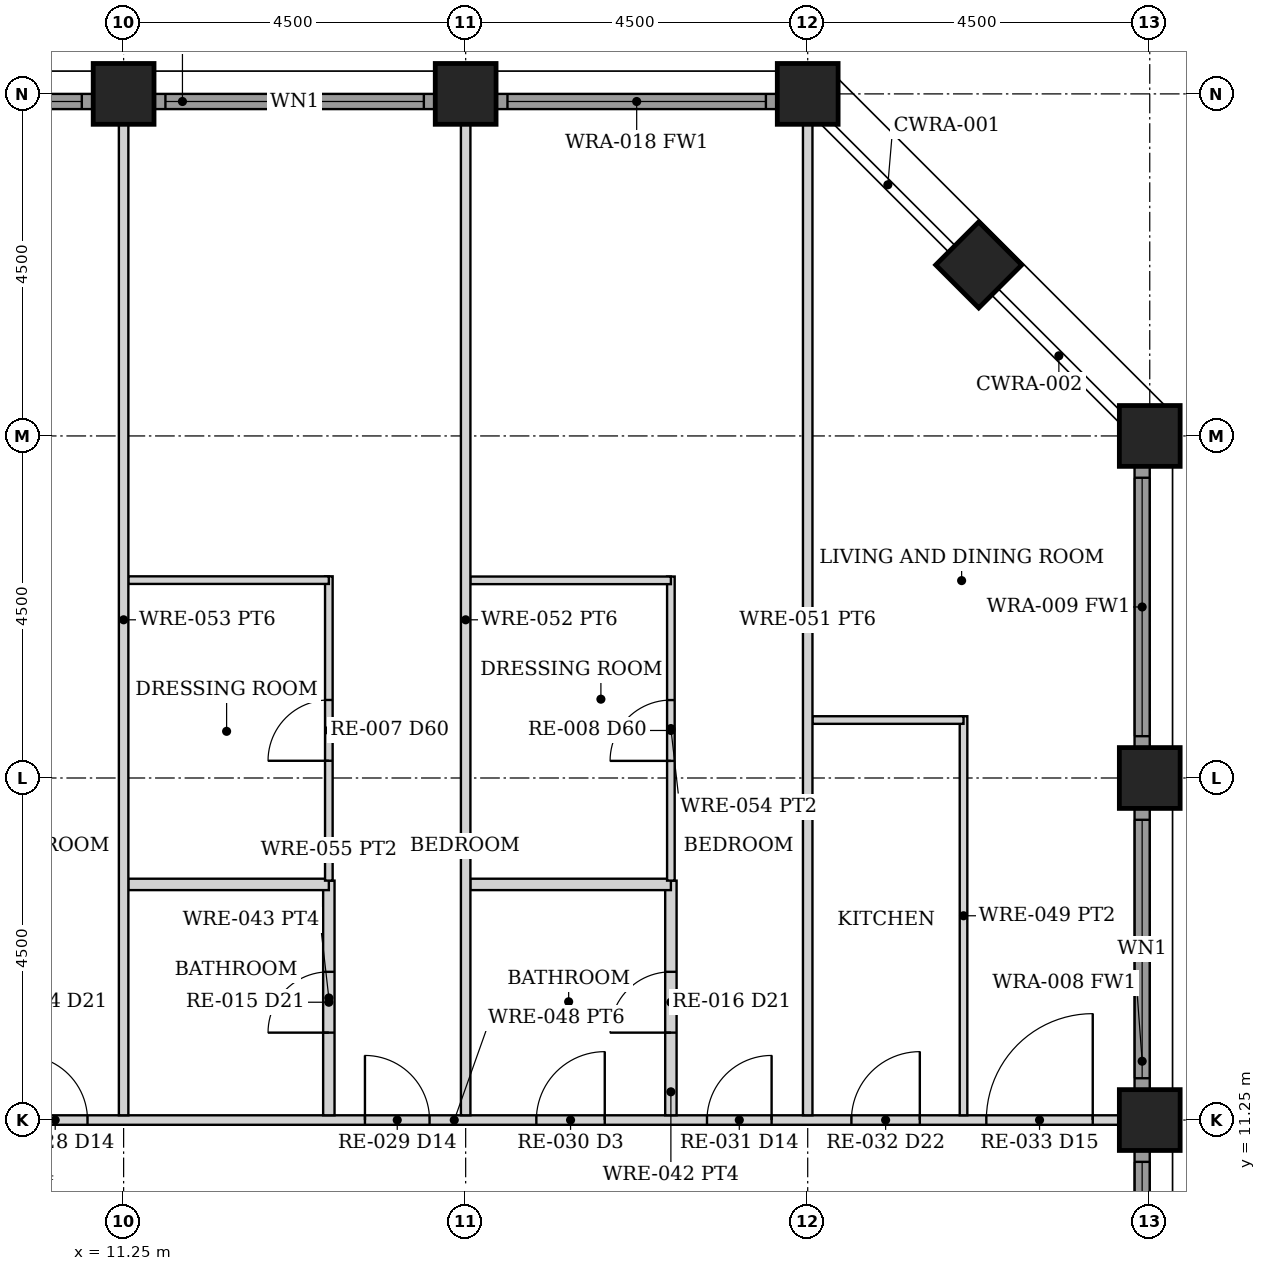
"""IFC4 building model, lengths in metres.
Left out: names, types, materials, properties, quantities, classifications, styles, units other than length and angle.
Written with IfcOpenShell. Run it as: python <this file> out.ifc"""

import sys

from ifc_helpers import new_model, si_unit, direction, frame, frame_2d, origin, origin_2d, place, context, subcontext, project, spatial, rectangle, hollow_rectangle, extrude, element, fill, save


model = new_model("IFC4")
c1 = context("Model", 3, precision=1e-05, world=origin(), true_north=direction((0.0, 1.0)))
c2 = subcontext(c1, "Body", "Model", "MODEL_VIEW")
j1 = project(units=[si_unit("LENGTHUNIT", "METRE"), si_unit("PLANEANGLEUNIT", "RADIAN")], contexts=[c1])
p1 = place(None, origin())
s1 = spatial("IfcSite", under=j1, at=p1, CompositionType="ELEMENT")
p2 = place(p1, origin())
s2 = spatial("IfcBuilding", under=s1, at=p2, CompositionType="ELEMENT")
p3 = place(p2, frame((0.0, 0.0, 68.5)))
s3 = spatial("IfcBuildingStorey", under=s2, at=p3, CompositionType="ELEMENT", Elevation=68.5)
for number, where, z_axis, x_axis in (
    (1, (11.25, 24.75, 0.0), (0.0, 0.0, 1.0), (0.0, 1.0, 0.0)),
    (2, (24.75, 11.25, 0.0), (0.0, 0.0, 1.0), (1.0, 0.0, 0.0)),
    (3, (15.75, 24.75, 0.0), (0.0, 0.0, 1.0), (0.0, 1.0, 0.0)),
    (4, (24.75, 15.75, 0.0), (0.0, 0.0, 1.0), (1.0, 0.0, 0.0)),
    (5, (20.25, 24.75, 0.0), (0.0, 0.0, 1.0), (0.0, 1.0, 0.0)),
    (6, (24.75, 20.25, 0.0), (0.0, 0.0, 1.0), (1.0, 0.0, 0.0)),
    (7, (22.5, 22.5, 0.0), (0.0, 0.0, 1.0), (0.707, 0.707, 0.0)),
):
    element("IfcColumn", number, at=place(p3, frame(where, z_axis=z_axis, x_axis=x_axis)), inside=s3, PredefinedType="COLUMN", context=c2, shape_type="SweptSolid", body=[
        extrude(hollow_rectangle(XDim=0.8, YDim=0.8, WallThickness=0.06, at=origin_2d()), origin(), (0.0, 0.0, 1.0), 3.5),
    ])
p4 = place(p3, frame((24.65, 7.155, 0.0), z_axis=(0.0, 0.0, 1.0), x_axis=(0.0, 1.0, 0.0)))
e8 = element("IfcWall", 8, at=p4, inside=s3, PredefinedType="SOLIDWALL", context=c2, shape_type="SweptSolid", body=[
    extrude(rectangle(XDim=3.69, YDim=0.2, at=frame_2d((1.845, 0.0))), origin(), (0.0, 0.0, 1.0), 2.379),
])
p5 = place(p4, frame((0.145, 0.0, 0.3)))
e9 = element("IfcOpeningElement", 9, at=p5, cuts=e8, PredefinedType="OPENING", context=c2, shape_type="SweptSolid", body=[
    extrude(rectangle(XDim=3.4, YDim=1.929, at=frame_2d((1.7, 0.964))), frame((0.0, 0.11, 0.0), z_axis=(0.0, -1.0, 0.0), x_axis=(1.0, 0.0, 0.0)), (0.0, 0.0, 1.0), 0.22),
])
p6 = place(p3, frame((24.65, 11.655, 0.0), z_axis=(0.0, 0.0, 1.0), x_axis=(0.0, 1.0, 0.0)))
e10 = element("IfcWall", 10, at=p6, inside=s3, PredefinedType="SOLIDWALL", context=c2, shape_type="SweptSolid", body=[
    extrude(rectangle(XDim=3.69, YDim=0.2, at=frame_2d((1.845, 0.0))), origin(), (0.0, 0.0, 1.0), 2.379),
])
p7 = place(p6, frame((0.145, 0.0, 0.3)))
e11 = element("IfcOpeningElement", 11, at=p7, cuts=e10, PredefinedType="OPENING", context=c2, shape_type="SweptSolid", body=[
    extrude(rectangle(XDim=3.4, YDim=1.929, at=frame_2d((1.7, 0.964))), frame((0.0, 0.11, 0.0), z_axis=(0.0, -1.0, 0.0), x_axis=(1.0, 0.0, 0.0)), (0.0, 0.0, 1.0), 0.22),
])
p8 = place(p3, frame((24.65, 16.155, 0.0), z_axis=(0.0, 0.0, 1.0), x_axis=(0.0, 1.0, 0.0)))
e12 = element("IfcWall", 12, at=p8, inside=s3, PredefinedType="SOLIDWALL", context=c2, shape_type="SweptSolid", body=[
    extrude(rectangle(XDim=3.69, YDim=0.2, at=frame_2d((1.845, 0.0))), origin(), (0.0, 0.0, 1.0), 2.379),
])
p9 = place(p8, frame((0.145, 0.0, 0.3)))
e13 = element("IfcOpeningElement", 13, at=p9, cuts=e12, PredefinedType="OPENING", context=c2, shape_type="SweptSolid", body=[
    extrude(rectangle(XDim=3.4, YDim=1.929, at=frame_2d((1.7, 0.964))), frame((0.0, 0.11, 0.0), z_axis=(0.0, -1.0, 0.0), x_axis=(1.0, 0.0, 0.0)), (0.0, 0.0, 1.0), 0.22),
])
p10 = place(p3, frame((7.155, 24.65, 0.0), z_axis=(0.0, 0.0, 1.0), x_axis=(1.0, 0.0, 0.0)))
e14 = element("IfcWall", 14, at=p10, inside=s3, PredefinedType="SOLIDWALL", context=c2, shape_type="SweptSolid", body=[
    extrude(rectangle(XDim=3.69, YDim=0.2, at=frame_2d((1.845, 0.0))), origin(), (0.0, 0.0, 1.0), 2.379),
])
p11 = place(p10, frame((0.145, 0.0, 0.3)))
e15 = element("IfcOpeningElement", 15, at=p11, cuts=e14, PredefinedType="OPENING", context=c2, shape_type="SweptSolid", body=[
    extrude(rectangle(XDim=3.4, YDim=1.929, at=frame_2d((1.7, 0.964))), frame((0.0, 0.11, 0.0), z_axis=(0.0, -1.0, 0.0), x_axis=(1.0, 0.0, 0.0)), (0.0, 0.0, 1.0), 0.22),
])
p12 = place(p3, frame((11.655, 24.65, 0.0), z_axis=(0.0, 0.0, 1.0), x_axis=(1.0, 0.0, 0.0)))
e16 = element("IfcWall", 16, at=p12, inside=s3, PredefinedType="SOLIDWALL", context=c2, shape_type="SweptSolid", body=[
    extrude(rectangle(XDim=3.69, YDim=0.2, at=frame_2d((1.845, 0.0))), origin(), (0.0, 0.0, 1.0), 2.379),
])
p13 = place(p12, frame((0.145, 0.0, 0.3)))
e17 = element("IfcOpeningElement", 17, at=p13, cuts=e16, PredefinedType="OPENING", context=c2, shape_type="SweptSolid", body=[
    extrude(rectangle(XDim=3.4, YDim=1.929, at=frame_2d((1.7, 0.964))), frame((0.0, 0.11, 0.0), z_axis=(0.0, -1.0, 0.0), x_axis=(1.0, 0.0, 0.0)), (0.0, 0.0, 1.0), 0.22),
])
p14 = place(p3, frame((16.155, 24.65, 0.0), z_axis=(0.0, 0.0, 1.0), x_axis=(1.0, 0.0, 0.0)))
e18 = element("IfcWall", 18, at=p14, inside=s3, PredefinedType="SOLIDWALL", context=c2, shape_type="SweptSolid", body=[
    extrude(rectangle(XDim=3.69, YDim=0.2, at=frame_2d((1.845, 0.0))), origin(), (0.0, 0.0, 1.0), 2.379),
])
p15 = place(p14, frame((0.145, 0.0, 0.3)))
e19 = element("IfcOpeningElement", 19, at=p15, cuts=e18, PredefinedType="OPENING", context=c2, shape_type="SweptSolid", body=[
    extrude(rectangle(XDim=3.4, YDim=1.929, at=frame_2d((1.7, 0.964))), frame((0.0, 0.11, 0.0), z_axis=(0.0, -1.0, 0.0), x_axis=(1.0, 0.0, 0.0)), (0.0, 0.0, 1.0), 0.22),
])
p16 = place(p3, frame((6.85, 11.25, 0.0), z_axis=(0.0, 0.0, 1.0), x_axis=(1.0, 0.0, 0.0)))
e20 = element("IfcWall", 20, at=p16, inside=s3, PredefinedType="PARTITIONING", context=c2, shape_type="SweptSolid", body=[
    extrude(rectangle(XDim=17.5, YDim=0.125, at=frame_2d((8.75, 0.0))), origin(), (0.0, 0.0, 1.0), 2.373),
])
p17 = place(p16, frame((13.975, 0.0, 0.0)))
e21 = element("IfcOpeningElement", 21, at=p17, cuts=e20, PredefinedType="OPENING", context=c2, shape_type="SweptSolid", body=[
    extrude(rectangle(XDim=0.9, YDim=2.1, at=frame_2d((0.45, 1.05))), frame((0.0, 0.073, 0.0), z_axis=(0.0, -1.0, 0.0), x_axis=(1.0, 0.0, 0.0)), (0.0, 0.0, 1.0), 0.145),
])
p18 = place(p16, frame((15.75, 0.0, 0.0)))
e22 = element("IfcOpeningElement", 22, at=p18, cuts=e20, PredefinedType="OPENING", context=c2, shape_type="SweptSolid", body=[
    extrude(rectangle(XDim=1.4, YDim=2.1, at=frame_2d((0.7, 1.05))), frame((0.0, 0.073, 0.0), z_axis=(0.0, -1.0, 0.0), x_axis=(1.0, 0.0, 0.0)), (0.0, 0.0, 1.0), 0.145),
])
p19 = place(p16, frame((12.075, 0.0, 0.0)))
e23 = element("IfcOpeningElement", 23, at=p19, cuts=e20, PredefinedType="OPENING", context=c2, shape_type="SweptSolid", body=[
    extrude(rectangle(XDim=0.85, YDim=2.1, at=frame_2d((0.425, 1.05))), frame((0.0, 0.073, 0.0), z_axis=(0.0, -1.0, 0.0), x_axis=(1.0, 0.0, 0.0)), (0.0, 0.0, 1.0), 0.145),
])
p20 = place(p16, frame((9.83, 0.0, 0.0)))
e24 = element("IfcOpeningElement", 24, at=p20, cuts=e20, PredefinedType="OPENING", context=c2, shape_type="SweptSolid", body=[
    extrude(rectangle(XDim=0.9, YDim=2.1, at=frame_2d((0.45, 1.05))), frame((0.0, 0.073, 0.0), z_axis=(0.0, -1.0, 0.0), x_axis=(1.0, 0.0, 0.0)), (0.0, 0.0, 1.0), 0.145),
])
p21 = place(p16, frame((7.575, 0.0, 0.0)))
e25 = element("IfcOpeningElement", 25, at=p21, cuts=e20, PredefinedType="OPENING", context=c2, shape_type="SweptSolid", body=[
    extrude(rectangle(XDim=0.85, YDim=2.1, at=frame_2d((0.425, 1.05))), frame((0.0, 0.073, 0.0), z_axis=(0.0, -1.0, 0.0), x_axis=(1.0, 0.0, 0.0)), (0.0, 0.0, 1.0), 0.145),
])
p22 = place(p16, frame((3.075, 0.0, 0.0)))
e26 = element("IfcOpeningElement", 26, at=p22, cuts=e20, PredefinedType="OPENING", context=c2, shape_type="SweptSolid", body=[
    extrude(rectangle(XDim=0.85, YDim=2.1, at=frame_2d((0.425, 1.05))), frame((0.0, 0.073, 0.0), z_axis=(0.0, -1.0, 0.0), x_axis=(1.0, 0.0, 0.0)), (0.0, 0.0, 1.0), 0.145),
])
p23 = place(p3, frame((22.3, 11.312, 0.0), z_axis=(0.0, 0.0, 1.0), x_axis=(0.0, 1.0, 0.0)))
e27 = element("IfcWall", 27, at=p23, inside=s3, PredefinedType="PARTITIONING", context=c2, shape_type="SweptSolid", body=[
    extrude(rectangle(XDim=5.25, YDim=0.1, at=frame_2d((2.625, 0.0))), origin(), (0.0, 0.0, 1.0), 2.373),
])
p24 = place(p3, frame((20.312, 16.512, 0.0), z_axis=(0.0, 0.0, 1.0), x_axis=(1.0, 0.0, 0.0)))
e28 = element("IfcWall", 28, at=p24, inside=s3, PredefinedType="PARTITIONING", context=c2, shape_type="SweptSolid", body=[
    extrude(rectangle(XDim=1.988, YDim=0.1, at=frame_2d((0.994, 0.0))), origin(), (0.0, 0.0, 1.0), 2.373),
])
p25 = place(p3, frame((20.25, 11.312, 0.0), z_axis=(0.0, 0.0, 1.0), x_axis=(0.0, 1.0, 0.0)))
e29 = element("IfcWall", 29, at=p25, inside=s3, PredefinedType="PARTITIONING", context=c2, shape_type="SweptSolid", body=[
    extrude(rectangle(XDim=13.038, YDim=0.125, at=frame_2d((6.519, 0.0))), origin(), (0.0, 0.0, 1.0), 2.373),
])
p26 = place(p3, frame((18.45, 11.312, 0.0), z_axis=(0.0, 0.0, 1.0), x_axis=(0.0, 1.0, 0.0)))
e30 = element("IfcWall", 30, at=p26, inside=s3, PredefinedType="PARTITIONING", context=c2, shape_type="SweptSolid", body=[
    extrude(rectangle(XDim=3.087, YDim=0.15, at=frame_2d((1.544, 0.0))), origin(), (0.0, 0.0, 1.0), 2.373),
])
p27 = place(p26, frame((1.087, 0.0, 0.0)))
e31 = element("IfcOpeningElement", 31, at=p27, cuts=e30, PredefinedType="OPENING", context=c2, shape_type="SweptSolid", body=[
    extrude(rectangle(XDim=0.8, YDim=2.1, at=frame_2d((0.4, 1.05))), frame((0.0, 0.085, 0.0), z_axis=(0.0, -1.0, 0.0), x_axis=(1.0, 0.0, 0.0)), (0.0, 0.0, 1.0), 0.17),
])
p28 = place(p3, frame((15.81, 14.35, 0.0), z_axis=(0.0, 0.0, 1.0), x_axis=(1.0, 0.0, 0.0)))
e32 = element("IfcWall", 32, at=p28, inside=s3, PredefinedType="PARTITIONING", context=c2, shape_type="SweptSolid", body=[
    extrude(rectangle(XDim=2.64, YDim=0.15, at=frame_2d((1.32, 0.0))), origin(), (0.0, 0.0, 1.0), 2.373),
])
p29 = place(p3, frame((18.45, 14.4, 0.0), z_axis=(0.0, 0.0, 1.0), x_axis=(0.0, 1.0, 0.0)))
e33 = element("IfcWall", 33, at=p29, inside=s3, PredefinedType="PARTITIONING", context=c2, shape_type="SweptSolid", body=[
    extrude(rectangle(XDim=4.0, YDim=0.1, at=frame_2d((2.0, 0.0))), origin(), (0.0, 0.0, 1.0), 2.373),
])
p30 = place(p29, frame((1.575, 0.0, 0.0)))
e34 = element("IfcOpeningElement", 34, at=p30, cuts=e33, PredefinedType="OPENING", context=c2, shape_type="SweptSolid", body=[
    extrude(rectangle(XDim=0.8, YDim=2.1, at=frame_2d((0.4, 1.05))), frame((0.0, 0.06, 0.0), z_axis=(0.0, -1.0, 0.0), x_axis=(1.0, 0.0, 0.0)), (0.0, 0.0, 1.0), 0.12),
])
p31 = place(p3, frame((15.81, 18.35, 0.0), z_axis=(0.0, 0.0, 1.0), x_axis=(1.0, 0.0, 0.0)))
e35 = element("IfcWall", 35, at=p31, inside=s3, PredefinedType="PARTITIONING", context=c2, shape_type="SweptSolid", body=[
    extrude(rectangle(XDim=2.64, YDim=0.1, at=frame_2d((1.32, 0.0))), origin(), (0.0, 0.0, 1.0), 2.373),
])
p32 = place(p3, frame((15.75, 11.312, 0.0), z_axis=(0.0, 0.0, 1.0), x_axis=(0.0, 1.0, 0.0)))
e36 = element("IfcWall", 36, at=p32, inside=s3, PredefinedType="PARTITIONING", context=c2, shape_type="SweptSolid", body=[
    extrude(rectangle(XDim=13.038, YDim=0.125, at=frame_2d((6.519, 0.0))), origin(), (0.0, 0.0, 1.0), 2.373),
])
p33 = place(p3, frame((13.95, 11.312, 0.0), z_axis=(0.0, 0.0, 1.0), x_axis=(0.0, 1.0, 0.0)))
e37 = element("IfcWall", 37, at=p33, inside=s3, PredefinedType="PARTITIONING", context=c2, shape_type="SweptSolid", body=[
    extrude(rectangle(XDim=3.087, YDim=0.15, at=frame_2d((1.544, 0.0))), origin(), (0.0, 0.0, 1.0), 2.373),
])
p34 = place(p33, frame((1.087, 0.0, 0.0)))
e38 = element("IfcOpeningElement", 38, at=p34, cuts=e37, PredefinedType="OPENING", context=c2, shape_type="SweptSolid", body=[
    extrude(rectangle(XDim=0.8, YDim=2.1, at=frame_2d((0.4, 1.05))), frame((0.0, 0.085, 0.0), z_axis=(0.0, -1.0, 0.0), x_axis=(1.0, 0.0, 0.0)), (0.0, 0.0, 1.0), 0.17),
])
p35 = place(p3, frame((11.31, 14.35, 0.0), z_axis=(0.0, 0.0, 1.0), x_axis=(1.0, 0.0, 0.0)))
e39 = element("IfcWall", 39, at=p35, inside=s3, PredefinedType="PARTITIONING", context=c2, shape_type="SweptSolid", body=[
    extrude(rectangle(XDim=2.64, YDim=0.15, at=frame_2d((1.32, 0.0))), origin(), (0.0, 0.0, 1.0), 2.373),
])
p36 = place(p3, frame((13.95, 14.4, 0.0), z_axis=(0.0, 0.0, 1.0), x_axis=(0.0, 1.0, 0.0)))
e40 = element("IfcWall", 40, at=p36, inside=s3, PredefinedType="PARTITIONING", context=c2, shape_type="SweptSolid", body=[
    extrude(rectangle(XDim=4.003, YDim=0.1, at=frame_2d((2.001, 0.0))), origin(), (0.0, 0.0, 1.0), 2.373),
])
p37 = place(p36, frame((1.576, 0.0, 0.0)))
e41 = element("IfcOpeningElement", 41, at=p37, cuts=e40, PredefinedType="OPENING", context=c2, shape_type="SweptSolid", body=[
    extrude(rectangle(XDim=0.8, YDim=2.1, at=frame_2d((0.4, 1.05))), frame((0.0, 0.06, 0.0), z_axis=(0.0, -1.0, 0.0), x_axis=(1.0, 0.0, 0.0)), (0.0, 0.0, 1.0), 0.12),
])
p38 = place(p3, frame((11.31, 18.353, 0.0), z_axis=(0.0, 0.0, 1.0), x_axis=(1.0, 0.0, 0.0)))
e42 = element("IfcWall", 42, at=p38, inside=s3, PredefinedType="PARTITIONING", context=c2, shape_type="SweptSolid", body=[
    extrude(rectangle(XDim=2.64, YDim=0.1, at=frame_2d((1.32, 0.0))), origin(), (0.0, 0.0, 1.0), 2.373),
])
p39 = place(p3, frame((11.25, 11.312, 0.0), z_axis=(0.0, 0.0, 1.0), x_axis=(0.0, 1.0, 0.0)))
e43 = element("IfcWall", 43, at=p39, inside=s3, PredefinedType="PARTITIONING", context=c2, shape_type="SweptSolid", body=[
    extrude(rectangle(XDim=13.038, YDim=0.125, at=frame_2d((6.519, 0.0))), origin(), (0.0, 0.0, 1.0), 2.373),
])
p40 = place(p5, origin())
e44 = element("IfcWindow", 44, at=p40, inside=s3, PartitioningType="SINGLE_PANEL", PredefinedType="WINDOW", context=c2, shape_type="SweptSolid", body=[
    extrude(rectangle(XDim=3.4, YDim=1.929, at=frame_2d((1.7, 0.964))), frame((0.0, 0.03, 0.0), z_axis=(0.0, -1.0, 0.0), x_axis=(1.0, 0.0, 0.0)), (0.0, 0.0, 1.0), 0.06),
])
fill(e9, e44)
p41 = place(p7, origin())
e45 = element("IfcWindow", 45, at=p41, inside=s3, PartitioningType="SINGLE_PANEL", PredefinedType="WINDOW", context=c2, shape_type="SweptSolid", body=[
    extrude(rectangle(XDim=3.4, YDim=1.929, at=frame_2d((1.7, 0.964))), frame((0.0, 0.03, 0.0), z_axis=(0.0, -1.0, 0.0), x_axis=(1.0, 0.0, 0.0)), (0.0, 0.0, 1.0), 0.06),
])
fill(e11, e45)
p42 = place(p9, origin())
e46 = element("IfcWindow", 46, at=p42, inside=s3, PartitioningType="SINGLE_PANEL", PredefinedType="WINDOW", context=c2, shape_type="SweptSolid", body=[
    extrude(rectangle(XDim=3.4, YDim=1.929, at=frame_2d((1.7, 0.964))), frame((0.0, 0.03, 0.0), z_axis=(0.0, -1.0, 0.0), x_axis=(1.0, 0.0, 0.0)), (0.0, 0.0, 1.0), 0.06),
])
fill(e13, e46)
p43 = place(p11, origin())
e47 = element("IfcWindow", 47, at=p43, inside=s3, PartitioningType="SINGLE_PANEL", PredefinedType="WINDOW", context=c2, shape_type="SweptSolid", body=[
    extrude(rectangle(XDim=3.4, YDim=1.929, at=frame_2d((1.7, 0.964))), frame((0.0, 0.03, 0.0), z_axis=(0.0, -1.0, 0.0), x_axis=(1.0, 0.0, 0.0)), (0.0, 0.0, 1.0), 0.06),
])
fill(e15, e47)
p44 = place(p13, origin())
e48 = element("IfcWindow", 48, at=p44, inside=s3, PartitioningType="SINGLE_PANEL", PredefinedType="WINDOW", context=c2, shape_type="SweptSolid", body=[
    extrude(rectangle(XDim=3.4, YDim=1.929, at=frame_2d((1.7, 0.964))), frame((0.0, 0.03, 0.0), z_axis=(0.0, -1.0, 0.0), x_axis=(1.0, 0.0, 0.0)), (0.0, 0.0, 1.0), 0.06),
])
fill(e17, e48)
p45 = place(p15, origin())
e49 = element("IfcWindow", 49, at=p45, inside=s3, PartitioningType="SINGLE_PANEL", PredefinedType="WINDOW", context=c2, shape_type="SweptSolid", body=[
    extrude(rectangle(XDim=3.4, YDim=1.929, at=frame_2d((1.7, 0.964))), frame((0.0, 0.03, 0.0), z_axis=(0.0, -1.0, 0.0), x_axis=(1.0, 0.0, 0.0)), (0.0, 0.0, 1.0), 0.06),
])
fill(e19, e49)
p46 = place(p17, origin())
e50 = element("IfcDoor", 50, at=p46, inside=s3, OperationType="SINGLE_SWING_RIGHT", PredefinedType="DOOR", context=c2, shape_type="SweptSolid", body=[
    extrude(rectangle(XDim=0.9, YDim=2.1, at=frame_2d((0.45, 1.05))), frame((0.0, 0.025, 0.0), z_axis=(0.0, -1.0, 0.0), x_axis=(1.0, 0.0, 0.0)), (0.0, 0.0, 1.0), 0.05),
])
fill(e21, e50)
p47 = place(p18, origin())
e51 = element("IfcDoor", 51, at=p47, inside=s3, OperationType="SINGLE_SWING_RIGHT", PredefinedType="DOOR", context=c2, shape_type="SweptSolid", body=[
    extrude(rectangle(XDim=1.4, YDim=2.1, at=frame_2d((0.7, 1.05))), frame((0.0, 0.025, 0.0), z_axis=(0.0, -1.0, 0.0), x_axis=(1.0, 0.0, 0.0)), (0.0, 0.0, 1.0), 0.05),
])
fill(e22, e51)
p48 = place(p19, origin())
e52 = element("IfcDoor", 52, at=p48, inside=s3, OperationType="SINGLE_SWING_RIGHT", PredefinedType="DOOR", context=c2, shape_type="SweptSolid", body=[
    extrude(rectangle(XDim=0.85, YDim=2.1, at=frame_2d((0.425, 1.05))), frame((0.0, 0.025, 0.0), z_axis=(0.0, -1.0, 0.0), x_axis=(1.0, 0.0, 0.0)), (0.0, 0.0, 1.0), 0.05),
])
fill(e23, e52)
p49 = place(p27, origin())
e53 = element("IfcDoor", 53, at=p49, inside=s3, OperationType="SINGLE_SWING_LEFT", PredefinedType="DOOR", context=c2, shape_type="SweptSolid", body=[
    extrude(rectangle(XDim=0.8, YDim=2.1, at=frame_2d((0.4, 1.05))), frame((0.0, 0.025, 0.0), z_axis=(0.0, -1.0, 0.0), x_axis=(1.0, 0.0, 0.0)), (0.0, 0.0, 1.0), 0.05),
])
fill(e31, e53)
p50 = place(p20, origin())
e54 = element("IfcDoor", 54, at=p50, inside=s3, OperationType="SINGLE_SWING_RIGHT", PredefinedType="DOOR", context=c2, shape_type="SweptSolid", body=[
    extrude(rectangle(XDim=0.9, YDim=2.1, at=frame_2d((0.45, 1.05))), frame((0.0, 0.025, 0.0), z_axis=(0.0, -1.0, 0.0), x_axis=(1.0, 0.0, 0.0)), (0.0, 0.0, 1.0), 0.05),
])
fill(e24, e54)
p51 = place(p30, origin())
e55 = element("IfcDoor", 55, at=p51, inside=s3, OperationType="SINGLE_SWING_LEFT", PredefinedType="DOOR", context=c2, shape_type="SweptSolid", body=[
    extrude(rectangle(XDim=0.8, YDim=2.1, at=frame_2d((0.4, 1.05))), frame((0.0, 0.025, 0.0), z_axis=(0.0, -1.0, 0.0), x_axis=(1.0, 0.0, 0.0)), (0.0, 0.0, 1.0), 0.05),
])
fill(e34, e55)
p52 = place(p21, origin())
e56 = element("IfcDoor", 56, at=p52, inside=s3, OperationType="SINGLE_SWING_LEFT", PredefinedType="DOOR", context=c2, shape_type="SweptSolid", body=[
    extrude(rectangle(XDim=0.85, YDim=2.1, at=frame_2d((0.425, 1.05))), frame((0.0, 0.025, 0.0), z_axis=(0.0, -1.0, 0.0), x_axis=(1.0, 0.0, 0.0)), (0.0, 0.0, 1.0), 0.05),
])
fill(e25, e56)
p53 = place(p34, origin())
e57 = element("IfcDoor", 57, at=p53, inside=s3, OperationType="SINGLE_SWING_LEFT", PredefinedType="DOOR", context=c2, shape_type="SweptSolid", body=[
    extrude(rectangle(XDim=0.8, YDim=2.1, at=frame_2d((0.4, 1.05))), frame((0.0, 0.025, 0.0), z_axis=(0.0, -1.0, 0.0), x_axis=(1.0, 0.0, 0.0)), (0.0, 0.0, 1.0), 0.05),
])
fill(e38, e57)
p54 = place(p37, origin())
e58 = element("IfcDoor", 58, at=p54, inside=s3, OperationType="SINGLE_SWING_LEFT", PredefinedType="DOOR", context=c2, shape_type="SweptSolid", body=[
    extrude(rectangle(XDim=0.8, YDim=2.1, at=frame_2d((0.4, 1.05))), frame((0.0, 0.025, 0.0), z_axis=(0.0, -1.0, 0.0), x_axis=(1.0, 0.0, 0.0)), (0.0, 0.0, 1.0), 0.05),
])
fill(e41, e58)
p55 = place(p22, origin())
e59 = element("IfcDoor", 59, at=p55, inside=s3, OperationType="SINGLE_SWING_LEFT", PredefinedType="DOOR", context=c2, shape_type="SweptSolid", body=[
    extrude(rectangle(XDim=0.85, YDim=2.1, at=frame_2d((0.425, 1.05))), frame((0.0, 0.025, 0.0), z_axis=(0.0, -1.0, 0.0), x_axis=(1.0, 0.0, 0.0)), (0.0, 0.0, 1.0), 0.05),
])
fill(e26, e59)
save(model, sys.argv[1])
